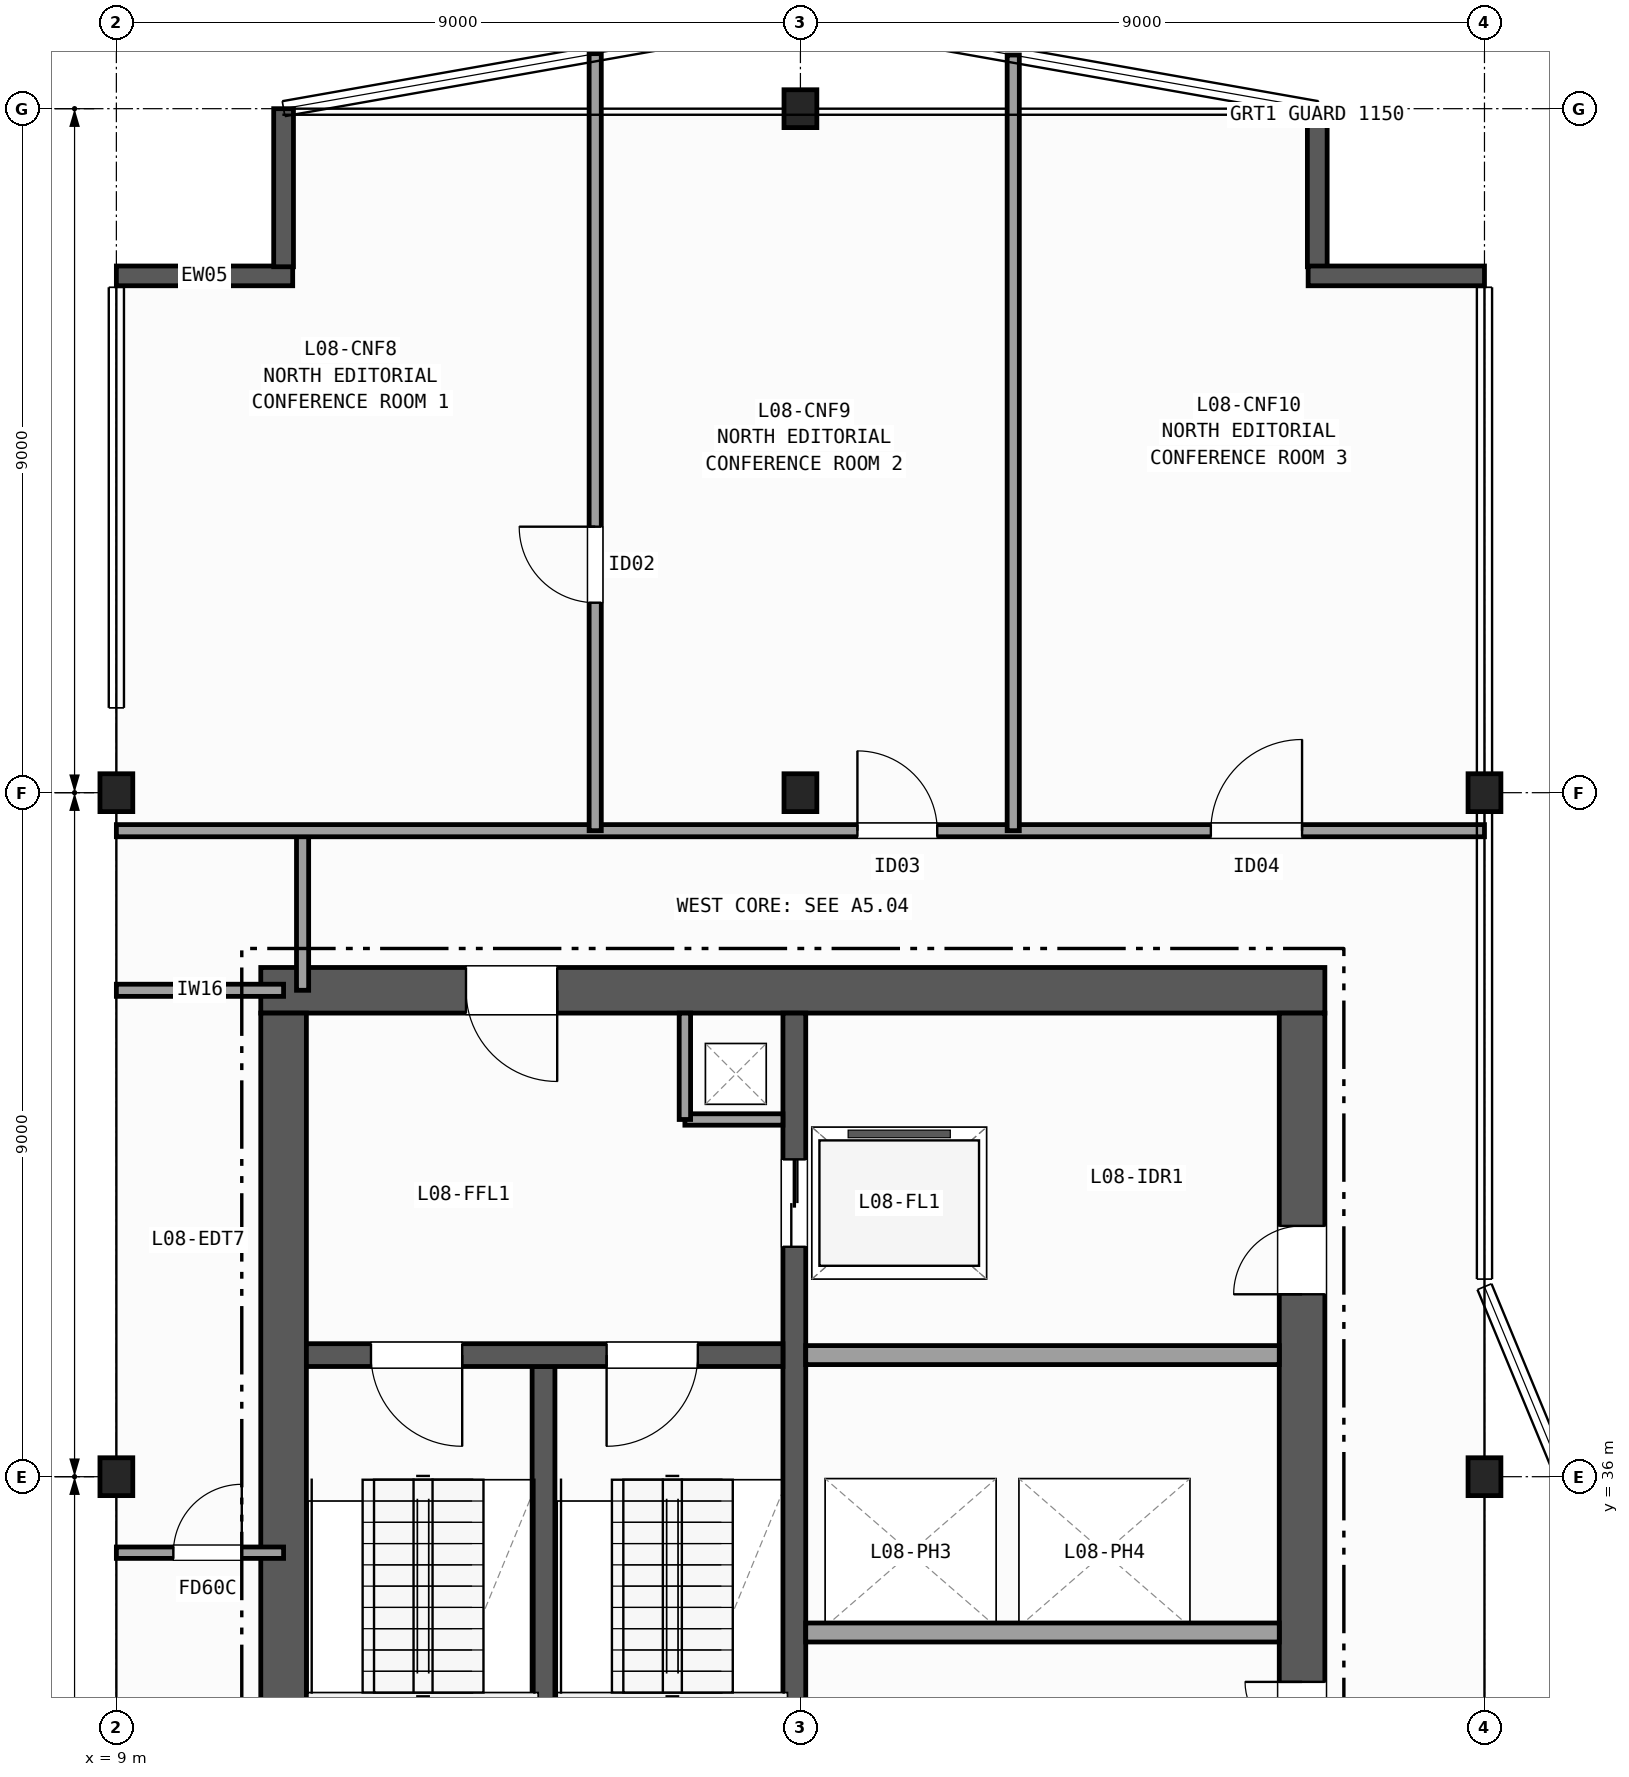
"""IFC4 building model, lengths in metres.
Left out: names, types, materials, properties, quantities, classifications, styles, units other than length and angle.
Written with IfcOpenShell. Run it as: python <this file> out.ifc"""

import sys

from ifc_helpers import new_model, si_unit, direction, frame, frame_2d, origin, origin_2d, place, context, subcontext, project, spatial, rectangle, i_section, extrude, element, fill, save


model = new_model("IFC4")
c1 = context("Model", 3, precision=1e-05, world=origin(), true_north=direction((0.0, 1.0)))
c2 = subcontext(c1, "Body", "Model", "MODEL_VIEW")
j1 = project(units=[si_unit("LENGTHUNIT", "METRE"), si_unit("PLANEANGLEUNIT", "RADIAN")], contexts=[c1])
p1 = place(None, origin())
s1 = spatial("IfcSite", under=j1, at=p1, CompositionType="ELEMENT")
p2 = place(p1, origin())
s2 = spatial("IfcBuilding", under=s1, at=p2, CompositionType="ELEMENT")
p3 = place(p2, frame((0.0, 0.0, 39.7)))
s3 = spatial("IfcBuildingStorey", under=s2, at=p3, CompositionType="ELEMENT", Elevation=39.7)
for number, where, z_axis, x_axis in (
    (1, (9.0, 36.0, 0.0), (0.0, 0.0, 1.0), (1.0, 0.0, 0.0)),
    (2, (9.0, 45.0, 0.0), (0.0, 0.0, 1.0), (1.0, 0.0, 0.0)),
    (3, (18.0, 45.0, 0.0), (0.0, 0.0, 1.0), (1.0, 0.0, 0.0)),
    (4, (18.0, 54.0, 0.0), (0.0, 0.0, 1.0), (1.0, 0.0, 0.0)),
    (5, (27.0, 36.0, 0.0), (0.0, 0.0, 1.0), (1.0, 0.0, 0.0)),
    (6, (27.0, 45.0, 0.0), (0.0, 0.0, 1.0), (1.0, 0.0, 0.0)),
):
    element("IfcColumn", number, at=place(p3, frame(where, z_axis=z_axis, x_axis=x_axis)), inside=s3, PredefinedType="COLUMN", context=c2, shape_type="SweptSolid", body=[
        extrude(i_section(OverallWidth=0.432, OverallDepth=0.498, WebThickness=0.056, FlangeThickness=0.089, FilletRadius=0.015, at=origin_2d()), origin(), (0.0, 0.0, 1.0), 3.7),
    ])
p4 = place(p3, frame((9.0, 51.8, 0.0), z_axis=(0.0, 0.0, 1.0), x_axis=(1.0, 0.0, 0.0)))
e7 = element("IfcWall", 7, at=p4, inside=s3, PredefinedType="SOLIDWALL", context=c2, shape_type="SweptSolid", body=[
    extrude(rectangle(XDim=2.32, YDim=0.26, at=frame_2d((1.16, 0.0))), origin(), (0.0, 0.0, 1.0), 3.42),
])
for number, where, z_axis, x_axis in (
    (8, (11.2, 51.92, 0.0), (0.0, 0.0, 1.0), (0.0, 1.0, 0.0)),
    (9, (24.8, 54.0, 0.0), (0.0, 0.0, 1.0), (0.0, -1.0, 0.0)),
):
    element("IfcWall", number, at=place(p3, frame(where, z_axis=z_axis, x_axis=x_axis)), inside=s3, PredefinedType="SOLIDWALL", context=c2, shape_type="SweptSolid", body=[
        extrude(rectangle(XDim=2.08, YDim=0.26, at=frame_2d((1.04, 0.0))), origin(), (0.0, 0.0, 1.0), 3.42),
    ])
p5 = place(p3, frame((24.68, 51.8, 0.0), z_axis=(0.0, 0.0, 1.0), x_axis=(1.0, 0.0, 0.0)))
e10 = element("IfcWall", 10, at=p5, inside=s3, PredefinedType="SOLIDWALL", context=c2, shape_type="SweptSolid", body=[
    extrude(rectangle(XDim=2.32, YDim=0.26, at=frame_2d((1.16, 0.0))), origin(), (0.0, 0.0, 1.0), 3.42),
])
p6 = place(p3, frame((24.9, 42.4, 0.0), z_axis=(0.0, 0.0, 1.0), x_axis=(-1.0, 0.0, 0.0)))
e11 = element("IfcWall", 11, at=p6, inside=s3, PredefinedType="SHEAR", context=c2, shape_type="SweptSolid", body=[
    extrude(rectangle(XDim=14.0, YDim=0.6, at=frame_2d((7.0, 0.0))), origin(), (0.0, 0.0, 1.0), 3.42),
])
p7 = place(p6, frame((10.1, 0.0, 0.0)))
e12 = element("IfcOpeningElement", 12, at=p7, cuts=e11, PredefinedType="OPENING", context=c2, shape_type="SweptSolid", body=[
    extrude(rectangle(XDim=1.2, YDim=2.15, at=frame_2d((0.6, 1.075))), frame((0.0, 0.31, 0.0), z_axis=(0.0, -1.0, 0.0), x_axis=(1.0, 0.0, 0.0)), (0.0, 0.0, 1.0), 0.62),
])
p8 = place(p3, frame((11.2, 42.1, 0.0), z_axis=(0.0, 0.0, 1.0), x_axis=(0.0, -1.0, 0.0)))
e13 = element("IfcWall", 13, at=p8, inside=s3, PredefinedType="SHEAR", context=c2, shape_type="SweptSolid", body=[
    extrude(rectangle(XDim=13.6, YDim=0.6, at=frame_2d((6.8, 0.0))), origin(), (0.0, 0.0, 1.0), 3.42),
])
p9 = place(p3, frame((24.6, 28.5, 0.0), z_axis=(0.0, 0.0, 1.0), x_axis=(0.0, 1.0, 0.0)))
e14 = element("IfcWall", 14, at=p9, inside=s3, PredefinedType="SHEAR", context=c2, shape_type="SweptSolid", body=[
    extrude(rectangle(XDim=13.6, YDim=0.6, at=frame_2d((6.8, 0.0))), origin(), (0.0, 0.0, 1.0), 3.42),
])
p10 = place(p9, frame((3.3, 0.0, 0.0)))
e15 = element("IfcOpeningElement", 15, at=p10, cuts=e14, PredefinedType="OPENING", context=c2, shape_type="SweptSolid", body=[
    extrude(rectangle(XDim=1.5, YDim=2.2, at=frame_2d((0.75, 1.1))), frame((0.0, 0.31, 0.0), z_axis=(0.0, -1.0, 0.0), x_axis=(1.0, 0.0, 0.0)), (0.0, 0.0, 1.0), 0.62),
])
p11 = place(p9, frame((9.9, 0.0, 0.0)))
e16 = element("IfcOpeningElement", 16, at=p11, cuts=e14, PredefinedType="OPENING", context=c2, shape_type="SweptSolid", body=[
    extrude(rectangle(XDim=0.9, YDim=2.1, at=frame_2d((0.45, 1.05))), frame((0.0, 0.31, 0.0), z_axis=(0.0, -1.0, 0.0), x_axis=(1.0, 0.0, 0.0)), (0.0, 0.0, 1.0), 0.62),
])
p12 = place(p3, frame((14.62, 28.5, 0.0), z_axis=(0.0, 0.0, 1.0), x_axis=(0.0, 1.0, 0.0)))
e17 = element("IfcWall", 17, at=p12, inside=s3, PredefinedType="SHEAR", context=c2, shape_type="SweptSolid", body=[
    extrude(rectangle(XDim=8.95, YDim=0.3, at=frame_2d((4.475, 0.0))), origin(), (0.0, 0.0, 1.0), 3.42),
])
p13 = place(p3, frame((17.92, 42.1, 0.0), z_axis=(0.0, 0.0, 1.0), x_axis=(0.0, -1.0, 0.0)))
e18 = element("IfcWall", 18, at=p13, inside=s3, PredefinedType="SHEAR", context=c2, shape_type="SweptSolid", body=[
    extrude(rectangle(XDim=13.6, YDim=0.3, at=frame_2d((6.8, 0.0))), origin(), (0.0, 0.0, 1.0), 3.42),
])
p14 = place(p13, frame((1.925, 0.0, 0.0)))
e19 = element("IfcOpeningElement", 19, at=p14, cuts=e18, PredefinedType="OPENING", context=c2, shape_type="SweptSolid", body=[
    extrude(rectangle(XDim=1.15, YDim=2.15, at=frame_2d((0.575, 1.075))), frame((0.0, 0.16, 0.0), z_axis=(0.0, -1.0, 0.0), x_axis=(1.0, 0.0, 0.0)), (0.0, 0.0, 1.0), 0.32),
])
p15 = place(p3, frame((17.77, 37.6, 0.0), z_axis=(0.0, 0.0, 1.0), x_axis=(-1.0, 0.0, 0.0)))
e20 = element("IfcWall", 20, at=p15, inside=s3, PredefinedType="SHEAR", context=c2, shape_type="SweptSolid", body=[
    extrude(rectangle(XDim=6.27, YDim=0.3, at=frame_2d((3.135, 0.0))), origin(), (0.0, 0.0, 1.0), 3.42),
])
p16 = place(p15, frame((4.22, 0.0, 0.0)))
e21 = element("IfcOpeningElement", 21, at=p16, cuts=e20, PredefinedType="OPENING", context=c2, shape_type="SweptSolid", body=[
    extrude(rectangle(XDim=1.2, YDim=2.15, at=frame_2d((0.6, 1.075))), frame((0.0, 0.16, 0.0), z_axis=(0.0, -1.0, 0.0), x_axis=(1.0, 0.0, 0.0)), (0.0, 0.0, 1.0), 0.32),
])
p17 = place(p15, frame((1.12, 0.0, 0.0)))
e22 = element("IfcOpeningElement", 22, at=p17, cuts=e20, PredefinedType="OPENING", context=c2, shape_type="SweptSolid", body=[
    extrude(rectangle(XDim=1.2, YDim=2.15, at=frame_2d((0.6, 1.075))), frame((0.0, 0.16, 0.0), z_axis=(0.0, -1.0, 0.0), x_axis=(1.0, 0.0, 0.0)), (0.0, 0.0, 1.0), 0.32),
])
p18 = place(p3, frame((16.48, 40.7, 0.0), z_axis=(0.0, 0.0, 1.0), x_axis=(1.0, 0.0, 0.0)))
e23 = element("IfcWall", 23, at=p18, inside=s3, PredefinedType="PARTITIONING", context=c2, shape_type="SweptSolid", body=[
    extrude(rectangle(XDim=1.29, YDim=0.15, at=frame_2d((0.645, 0.0))), origin(), (0.0, 0.0, 1.0), 3.42),
])
p19 = place(p3, frame((16.48, 40.7, 0.0), z_axis=(0.0, 0.0, 1.0), x_axis=(0.0, 1.0, 0.0)))
e24 = element("IfcWall", 24, at=p19, inside=s3, PredefinedType="PARTITIONING", context=c2, shape_type="SweptSolid", body=[
    extrude(rectangle(XDim=1.4, YDim=0.15, at=frame_2d((0.7, 0.0))), origin(), (0.0, 0.0, 1.0), 3.42),
])
for number, where, z_axis, x_axis in (
    (25, (18.07, 37.6, 0.0), (0.0, 0.0, 1.0), (1.0, 0.0, 0.0)),
    (26, (24.3, 33.95, 0.0), (0.0, 0.0, 1.0), (-1.0, 0.0, 0.0)),
):
    element("IfcWall", number, at=place(p3, frame(where, z_axis=z_axis, x_axis=x_axis)), inside=s3, PredefinedType="PARTITIONING", context=c2, shape_type="SweptSolid", body=[
        extrude(rectangle(XDim=6.23, YDim=0.25, at=frame_2d((3.115, 0.0))), origin(), (0.0, 0.0, 1.0), 3.42),
    ])
p20 = place(p3, frame((9.0, 42.4, 0.0), z_axis=(0.0, 0.0, 1.0), x_axis=(1.0, 0.0, 0.0)))
e27 = element("IfcWall", 27, at=p20, inside=s3, PredefinedType="PARTITIONING", context=c2, shape_type="SweptSolid", body=[
    extrude(rectangle(XDim=2.2, YDim=0.16, at=frame_2d((1.1, 0.0))), origin(), (0.0, 0.0, 1.0), 2.627),
])
p21 = place(p3, frame((11.45, 42.4, 0.0), z_axis=(0.0, 0.0, 1.0), x_axis=(0.0, 1.0, 0.0)))
e28 = element("IfcWall", 28, at=p21, inside=s3, PredefinedType="PARTITIONING", context=c2, shape_type="SweptSolid", body=[
    extrude(rectangle(XDim=2.1, YDim=0.16, at=frame_2d((1.05, 0.0))), origin(), (0.0, 0.0, 1.0), 3.42),
])
p22 = place(p3, frame((9.0, 35.0, 0.0), z_axis=(0.0, 0.0, 1.0), x_axis=(1.0, 0.0, 0.0)))
e29 = element("IfcWall", 29, at=p22, inside=s3, PredefinedType="PARTITIONING", context=c2, shape_type="SweptSolid", body=[
    extrude(rectangle(XDim=2.2, YDim=0.15, at=frame_2d((1.1, 0.0))), origin(), (0.0, 0.0, 1.0), 2.627),
])
p23 = place(p22, frame((0.75, 0.0, 0.0)))
e30 = element("IfcOpeningElement", 30, at=p23, cuts=e29, PredefinedType="OPENING", context=c2, shape_type="SweptSolid", body=[
    extrude(rectangle(XDim=0.9, YDim=2.1, at=frame_2d((0.45, 1.05))), frame((0.0, 0.085, 0.0), z_axis=(0.0, -1.0, 0.0), x_axis=(1.0, 0.0, 0.0)), (0.0, 0.0, 1.0), 0.17),
])
p24 = place(p3, frame((9.0, 44.5, 0.0), z_axis=(0.0, 0.0, 1.0), x_axis=(1.0, 0.0, 0.0)))
e31 = element("IfcWall", 31, at=p24, inside=s3, PredefinedType="PARTITIONING", context=c2, shape_type="SweptSolid", body=[
    extrude(rectangle(XDim=18.0, YDim=0.16, at=frame_2d((9.0, 0.0))), origin(), (0.0, 0.0, 1.0), 2.627),
])
p25 = place(p24, frame((9.75, 0.0, 0.0)))
e32 = element("IfcOpeningElement", 32, at=p25, cuts=e31, PredefinedType="OPENING", context=c2, shape_type="SweptSolid", body=[
    extrude(rectangle(XDim=1.05, YDim=2.15, at=frame_2d((0.525, 1.075))), frame((0.0, 0.09, 0.0), z_axis=(0.0, -1.0, 0.0), x_axis=(1.0, 0.0, 0.0)), (0.0, 0.0, 1.0), 0.18),
])
p26 = place(p24, frame((14.4, 0.0, 0.0)))
e33 = element("IfcOpeningElement", 33, at=p26, cuts=e31, PredefinedType="OPENING", context=c2, shape_type="SweptSolid", body=[
    extrude(rectangle(XDim=1.2, YDim=2.15, at=frame_2d((0.6, 1.075))), frame((0.0, 0.09, 0.0), z_axis=(0.0, -1.0, 0.0), x_axis=(1.0, 0.0, 0.0)), (0.0, 0.0, 1.0), 0.18),
])
p27 = place(p3, frame((15.3, 44.5, 0.0), z_axis=(0.0, 0.0, 1.0), x_axis=(0.0, 1.0, 0.0)))
e34 = element("IfcWall", 34, at=p27, inside=s3, PredefinedType="PARTITIONING", context=c2, shape_type="SweptSolid", body=[
    extrude(rectangle(XDim=10.224, YDim=0.16, at=frame_2d((5.112, 0.0))), origin(), (0.0, 0.0, 1.0), 3.42),
])
p28 = place(p27, frame((3.0, 0.0, 0.0)))
e35 = element("IfcOpeningElement", 35, at=p28, cuts=e34, PredefinedType="OPENING", context=c2, shape_type="SweptSolid", body=[
    extrude(rectangle(XDim=1.0, YDim=2.1, at=frame_2d((0.5, 1.05))), frame((0.0, 0.09, 0.0), z_axis=(0.0, -1.0, 0.0), x_axis=(1.0, 0.0, 0.0)), (0.0, 0.0, 1.0), 0.18),
])
p29 = place(p3, frame((20.8, 44.5, 0.0), z_axis=(0.0, 0.0, 1.0), x_axis=(0.0, 1.0, 0.0)))
e36 = element("IfcWall", 36, at=p29, inside=s3, PredefinedType="PARTITIONING", context=c2, shape_type="SweptSolid", body=[
    extrude(rectangle(XDim=10.206, YDim=0.16, at=frame_2d((5.103, 0.0))), origin(), (0.0, 0.0, 1.0), 3.42),
])
p30 = place(p16, origin())
e37 = element("IfcDoor", 37, at=p30, inside=s3, OperationType="SINGLE_SWING_LEFT", PredefinedType="DOOR", context=c2, shape_type="SweptSolid", body=[
    extrude(rectangle(XDim=1.2, YDim=2.15, at=frame_2d((0.6, 1.075))), frame((0.0, 0.025, 0.0), z_axis=(0.0, -1.0, 0.0), x_axis=(1.0, 0.0, 0.0)), (0.0, 0.0, 1.0), 0.05),
])
fill(e21, e37)
p31 = place(p17, origin())
e38 = element("IfcDoor", 38, at=p31, inside=s3, OperationType="SINGLE_SWING_RIGHT", PredefinedType="DOOR", context=c2, shape_type="SweptSolid", body=[
    extrude(rectangle(XDim=1.2, YDim=2.15, at=frame_2d((0.6, 1.075))), frame((0.0, 0.025, 0.0), z_axis=(0.0, -1.0, 0.0), x_axis=(1.0, 0.0, 0.0)), (0.0, 0.0, 1.0), 0.05),
])
fill(e22, e38)
p32 = place(p10, origin())
e39 = element("IfcDoor", 39, at=p32, inside=s3, OperationType="DOUBLE_DOOR_SINGLE_SWING", PredefinedType="DOOR", context=c2, shape_type="SweptSolid", body=[
    extrude(rectangle(XDim=1.5, YDim=2.2, at=frame_2d((0.75, 1.1))), frame((0.0, 0.025, 0.0), z_axis=(0.0, -1.0, 0.0), x_axis=(1.0, 0.0, 0.0)), (0.0, 0.0, 1.0), 0.05),
])
fill(e15, e39)
p33 = place(p7, origin())
e40 = element("IfcDoor", 40, at=p33, inside=s3, OperationType="SINGLE_SWING_LEFT", PredefinedType="DOOR", context=c2, shape_type="SweptSolid", body=[
    extrude(rectangle(XDim=1.2, YDim=2.15, at=frame_2d((0.6, 1.075))), frame((0.0, 0.025, 0.0), z_axis=(0.0, -1.0, 0.0), x_axis=(1.0, 0.0, 0.0)), (0.0, 0.0, 1.0), 0.05),
])
fill(e12, e40)
p34 = place(p11, origin())
e41 = element("IfcDoor", 41, at=p34, inside=s3, OperationType="SINGLE_SWING_LEFT", PredefinedType="DOOR", context=c2, shape_type="SweptSolid", body=[
    extrude(rectangle(XDim=0.9, YDim=2.1, at=frame_2d((0.45, 1.05))), frame((0.0, 0.025, 0.0), z_axis=(0.0, -1.0, 0.0), x_axis=(1.0, 0.0, 0.0)), (0.0, 0.0, 1.0), 0.05),
])
fill(e16, e41)
p35 = place(p14, origin())
e42 = element("IfcDoor", 42, at=p35, inside=s3, OperationType="DOUBLE_DOOR_SLIDING", PredefinedType="DOOR", context=c2, shape_type="SweptSolid", body=[
    extrude(rectangle(XDim=1.15, YDim=2.15, at=frame_2d((0.575, 1.075))), frame((0.0, 0.025, 0.0), z_axis=(0.0, -1.0, 0.0), x_axis=(1.0, 0.0, 0.0)), (0.0, 0.0, 1.0), 0.05),
])
fill(e19, e42)
p36 = place(p23, origin())
e43 = element("IfcDoor", 43, at=p36, inside=s3, OperationType="SINGLE_SWING_RIGHT", PredefinedType="DOOR", context=c2, shape_type="SweptSolid", body=[
    extrude(rectangle(XDim=0.9, YDim=2.1, at=frame_2d((0.45, 1.05))), frame((0.0, 0.025, 0.0), z_axis=(0.0, -1.0, 0.0), x_axis=(1.0, 0.0, 0.0)), (0.0, 0.0, 1.0), 0.05),
])
fill(e30, e43)
p37 = place(p28, origin())
e44 = element("IfcDoor", 44, at=p37, inside=s3, OperationType="SINGLE_SWING_RIGHT", PredefinedType="DOOR", context=c2, shape_type="SweptSolid", body=[
    extrude(rectangle(XDim=1.0, YDim=2.1, at=frame_2d((0.5, 1.05))), frame((0.0, 0.025, 0.0), z_axis=(0.0, -1.0, 0.0), x_axis=(1.0, 0.0, 0.0)), (0.0, 0.0, 1.0), 0.05),
])
fill(e35, e44)
p38 = place(p25, origin())
e45 = element("IfcDoor", 45, at=p38, inside=s3, OperationType="SINGLE_SWING_LEFT", PredefinedType="DOOR", context=c2, shape_type="SweptSolid", body=[
    extrude(rectangle(XDim=1.05, YDim=2.15, at=frame_2d((0.525, 1.075))), frame((0.0, 0.025, 0.0), z_axis=(0.0, -1.0, 0.0), x_axis=(1.0, 0.0, 0.0)), (0.0, 0.0, 1.0), 0.05),
])
fill(e32, e45)
p39 = place(p26, origin())
e46 = element("IfcDoor", 46, at=p39, inside=s3, OperationType="SINGLE_SWING_RIGHT", PredefinedType="DOOR", context=c2, shape_type="SweptSolid", body=[
    extrude(rectangle(XDim=1.2, YDim=2.15, at=frame_2d((0.6, 1.075))), frame((0.0, 0.025, 0.0), z_axis=(0.0, -1.0, 0.0), x_axis=(1.0, 0.0, 0.0)), (0.0, 0.0, 1.0), 0.05),
])
fill(e33, e46)
save(model, sys.argv[1])
